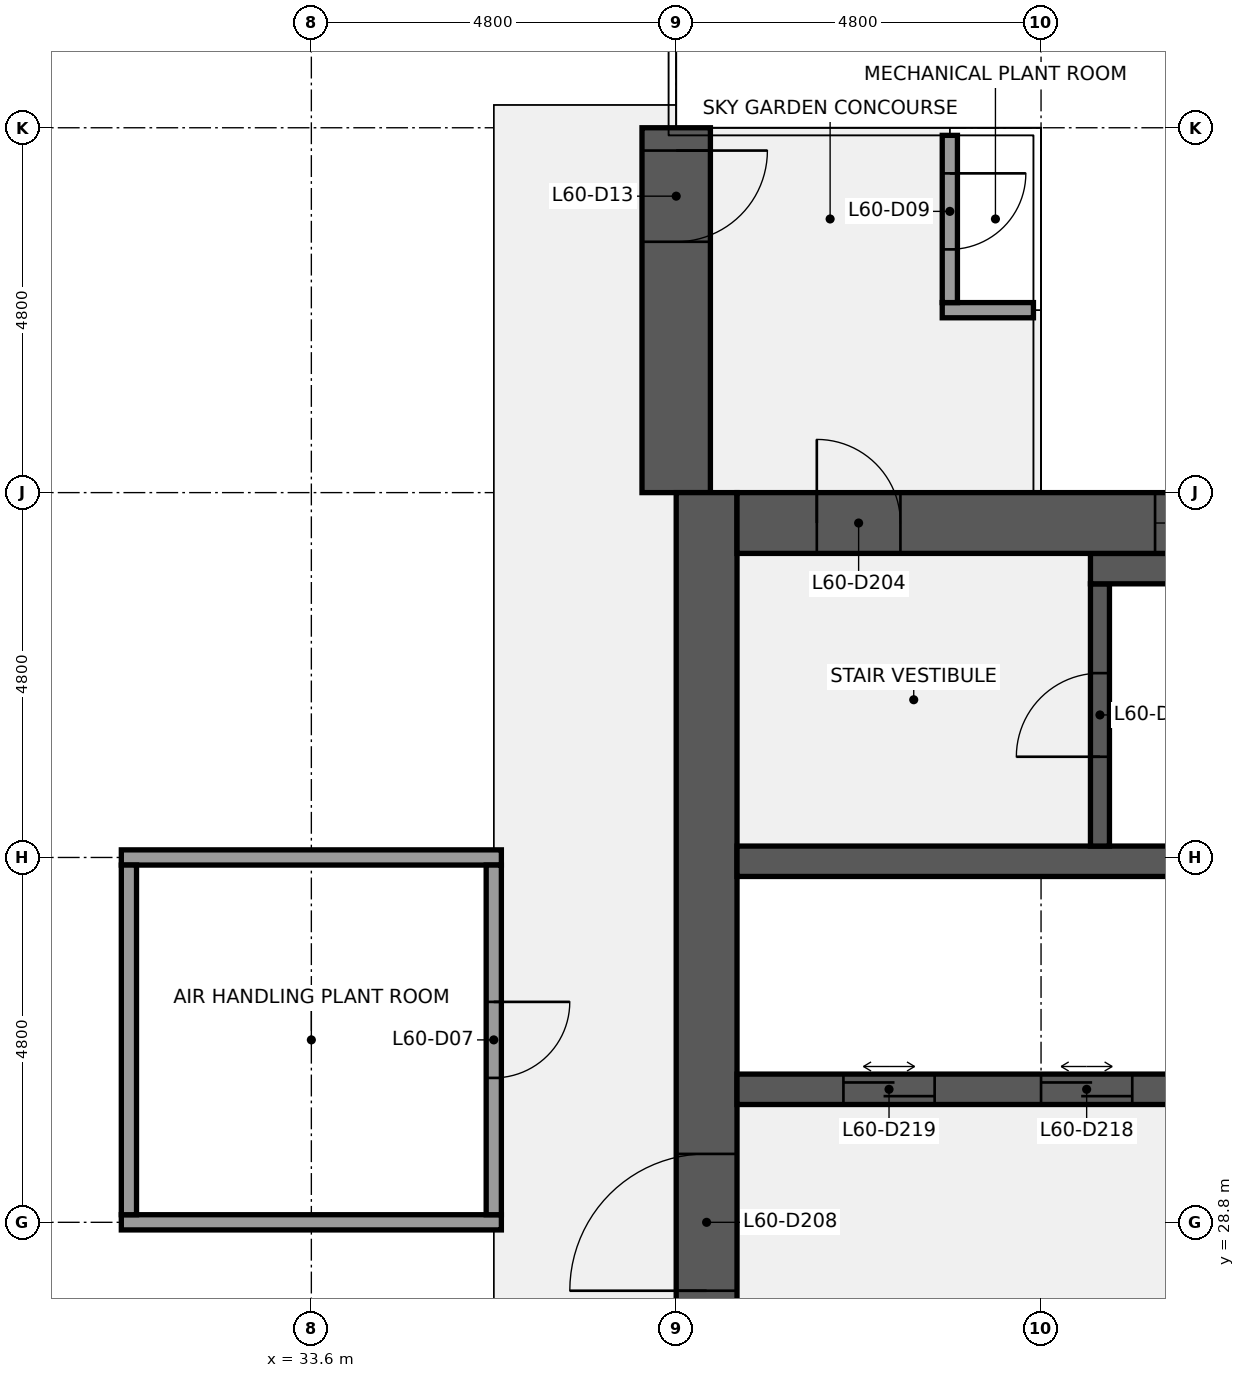
"""IFC4 building model, lengths in metres.
Left out: names, types, materials, properties, quantities, classifications, styles, units other than length and angle.
Written with IfcOpenShell. Run it as: python <this file> out.ifc"""

import sys

from ifc_helpers import new_model, si_unit, direction, frame, frame_2d, origin, place, context, subcontext, project, spatial, rectangle, extrude, element, fill, save


model = new_model("IFC4")
c1 = context("Model", 3, precision=1e-05, world=origin(), true_north=direction((0.0, 1.0)))
c2 = subcontext(c1, "Body", "Model", "MODEL_VIEW")
j1 = project(units=[si_unit("LENGTHUNIT", "METRE"), si_unit("PLANEANGLEUNIT", "RADIAN")], contexts=[c1])
p1 = place(None, origin())
s1 = spatial("IfcSite", under=j1, at=p1, CompositionType="ELEMENT")
p2 = place(p1, origin())
s2 = spatial("IfcBuilding", under=s1, at=p2, CompositionType="ELEMENT")
p3 = place(p2, frame((0.0, 0.0, 269.7)))
s3 = spatial("IfcBuildingStorey", under=s2, at=p3, CompositionType="ELEMENT", Elevation=269.7)
p4 = place(p3, frame((38.4, 38.4, 0.0), z_axis=(0.0, 0.0, 1.0), x_axis=(0.0, 1.0, 0.0)))
e1 = element("IfcWall", 1, at=p4, inside=s3, PredefinedType="SHEAR", context=c2, shape_type="SweptSolid", body=[
    extrude(rectangle(XDim=4.8, YDim=0.9, at=frame_2d((2.4, 0.0))), origin(), (0.0, 0.0, 1.0), 12.3),
])
p5 = place(p4, frame((3.3, 0.0, 0.0)))
e2 = element("IfcOpeningElement", 2, at=p5, cuts=e1, PredefinedType="OPENING", context=c2, shape_type="SweptSolid", body=[
    extrude(rectangle(XDim=1.2, YDim=2.1, at=frame_2d((0.6, 1.05))), frame((0.0, 0.46, 0.0), z_axis=(0.0, -1.0, 0.0), x_axis=(1.0, 0.0, 0.0)), (0.0, 0.0, 1.0), 0.92),
])
p6 = place(p3, frame((38.8, 9.6, 0.0), z_axis=(0.0, 0.0, 1.0), x_axis=(0.0, 1.0, 0.0)))
e3 = element("IfcWall", 3, at=p6, inside=s3, PredefinedType="SHEAR", context=c2, shape_type="SweptSolid", body=[
    extrude(rectangle(XDim=28.8, YDim=0.8, at=frame_2d((14.4, 0.0))), origin(), (0.0, 0.0, 1.0), 12.3),
])
p7 = place(p6, frame((8.7, 0.0, 0.0)))
e4 = element("IfcOpeningElement", 4, at=p7, cuts=e3, PredefinedType="OPENING", context=c2, shape_type="SweptSolid", body=[
    extrude(rectangle(XDim=1.8, YDim=2.1, at=frame_2d((0.9, 1.05))), frame((0.0, 0.41, 0.0), z_axis=(0.0, -1.0, 0.0), x_axis=(1.0, 0.0, 0.0)), (0.0, 0.0, 1.0), 0.82),
])
p8 = place(p6, frame((18.3, 0.0, 0.0)))
e5 = element("IfcOpeningElement", 5, at=p8, cuts=e3, PredefinedType="OPENING", context=c2, shape_type="SweptSolid", body=[
    extrude(rectangle(XDim=1.8, YDim=2.1, at=frame_2d((0.9, 1.05))), frame((0.0, 0.41, 0.0), z_axis=(0.0, -1.0, 0.0), x_axis=(1.0, 0.0, 0.0)), (0.0, 0.0, 1.0), 0.82),
])
p9 = place(p3, frame((39.2, 30.55, 0.0), z_axis=(0.0, 0.0, 1.0), x_axis=(1.0, 0.0, 0.0)))
e6 = element("IfcWall", 6, at=p9, inside=s3, PredefinedType="SHEAR", context=c2, shape_type="SweptSolid", body=[
    extrude(rectangle(XDim=17.6, YDim=0.4, at=frame_2d((8.8, 0.0))), origin(), (0.0, 0.0, 1.0), 12.3),
])
p10 = place(p9, frame((15.0, 0.0, 0.0)))
e7 = element("IfcOpeningElement", 7, at=p10, cuts=e6, PredefinedType="OPENING", context=c2, shape_type="SweptSolid", body=[
    extrude(rectangle(XDim=1.2, YDim=2.1, at=frame_2d((0.6, 1.05))), frame((0.0, 0.21, 0.0), z_axis=(0.0, -1.0, 0.0), x_axis=(1.0, 0.0, 0.0)), (0.0, 0.0, 1.0), 0.42),
])
p11 = place(p9, frame((12.4, 0.0, 0.0)))
e8 = element("IfcOpeningElement", 8, at=p11, cuts=e6, PredefinedType="OPENING", context=c2, shape_type="SweptSolid", body=[
    extrude(rectangle(XDim=1.2, YDim=2.1, at=frame_2d((0.6, 1.05))), frame((0.0, 0.21, 0.0), z_axis=(0.0, -1.0, 0.0), x_axis=(1.0, 0.0, 0.0)), (0.0, 0.0, 1.0), 0.42),
])
p12 = place(p9, frame((9.8, 0.0, 0.0)))
e9 = element("IfcOpeningElement", 9, at=p12, cuts=e6, PredefinedType="OPENING", context=c2, shape_type="SweptSolid", body=[
    extrude(rectangle(XDim=1.2, YDim=2.1, at=frame_2d((0.6, 1.05))), frame((0.0, 0.21, 0.0), z_axis=(0.0, -1.0, 0.0), x_axis=(1.0, 0.0, 0.0)), (0.0, 0.0, 1.0), 0.42),
])
p13 = place(p9, frame((6.6, 0.0, 0.0)))
e10 = element("IfcOpeningElement", 10, at=p13, cuts=e6, PredefinedType="OPENING", context=c2, shape_type="SweptSolid", body=[
    extrude(rectangle(XDim=1.2, YDim=2.1, at=frame_2d((0.6, 1.05))), frame((0.0, 0.21, 0.0), z_axis=(0.0, -1.0, 0.0), x_axis=(1.0, 0.0, 0.0)), (0.0, 0.0, 1.0), 0.42),
])
p14 = place(p9, frame((4.0, 0.0, 0.0)))
e11 = element("IfcOpeningElement", 11, at=p14, cuts=e6, PredefinedType="OPENING", context=c2, shape_type="SweptSolid", body=[
    extrude(rectangle(XDim=1.2, YDim=2.1, at=frame_2d((0.6, 1.05))), frame((0.0, 0.21, 0.0), z_axis=(0.0, -1.0, 0.0), x_axis=(1.0, 0.0, 0.0)), (0.0, 0.0, 1.0), 0.42),
])
p15 = place(p9, frame((1.4, 0.0, 0.0)))
e12 = element("IfcOpeningElement", 12, at=p15, cuts=e6, PredefinedType="OPENING", context=c2, shape_type="SweptSolid", body=[
    extrude(rectangle(XDim=1.2, YDim=2.1, at=frame_2d((0.6, 1.05))), frame((0.0, 0.21, 0.0), z_axis=(0.0, -1.0, 0.0), x_axis=(1.0, 0.0, 0.0)), (0.0, 0.0, 1.0), 0.42),
])
p16 = place(p3, frame((39.2, 33.55, 0.0), z_axis=(0.0, 0.0, 1.0), x_axis=(1.0, 0.0, 0.0)))
e13 = element("IfcWall", 13, at=p16, inside=s3, PredefinedType="SHEAR", context=c2, shape_type="SweptSolid", body=[
    extrude(rectangle(XDim=17.6, YDim=0.4, at=frame_2d((8.8, 0.0))), origin(), (0.0, 0.0, 1.0), 12.3),
])
p17 = place(p3, frame((43.975, 33.75, 0.0), z_axis=(0.0, 0.0, 1.0), x_axis=(0.0, 1.0, 0.0)))
e14 = element("IfcWall", 14, at=p17, inside=s3, PredefinedType="SHEAR", context=c2, shape_type="SweptSolid", body=[
    extrude(rectangle(XDim=3.45, YDim=0.25, at=frame_2d((1.725, 0.0))), origin(), (0.0, 0.0, 1.0), 12.3),
])
p18 = place(p17, frame((1.175, 0.0, 0.0)))
e15 = element("IfcOpeningElement", 15, at=p18, cuts=e14, PredefinedType="OPENING", context=c2, shape_type="SweptSolid", body=[
    extrude(rectangle(XDim=1.1, YDim=2.1, at=frame_2d((0.55, 1.05))), frame((0.0, 0.135, 0.0), z_axis=(0.0, -1.0, 0.0), x_axis=(1.0, 0.0, 0.0)), (0.0, 0.0, 1.0), 0.27),
])
p19 = place(p3, frame((43.85, 37.4, 0.0), z_axis=(0.0, 0.0, 1.0), x_axis=(1.0, 0.0, 0.0)))
e16 = element("IfcWall", 16, at=p19, inside=s3, PredefinedType="SHEAR", context=c2, shape_type="SweptSolid", body=[
    extrude(rectangle(XDim=7.5, YDim=0.4, at=frame_2d((3.75, 0.0))), origin(), (0.0, 0.0, 1.0), 12.3),
])
p20 = place(p3, frame((39.2, 38.0, 0.0), z_axis=(0.0, 0.0, 1.0), x_axis=(1.0, 0.0, 0.0)))
e17 = element("IfcWall", 17, at=p20, inside=s3, PredefinedType="SHEAR", context=c2, shape_type="SweptSolid", body=[
    extrude(rectangle(XDim=17.6, YDim=0.8, at=frame_2d((8.8, 0.0))), origin(), (0.0, 0.0, 1.0), 12.3),
])
p21 = place(p20, frame((1.05, 0.0, 0.0)))
e18 = element("IfcOpeningElement", 18, at=p21, cuts=e17, PredefinedType="OPENING", context=c2, shape_type="SweptSolid", body=[
    extrude(rectangle(XDim=1.1, YDim=2.1, at=frame_2d((0.55, 1.05))), frame((0.0, 0.41, 0.0), z_axis=(0.0, -1.0, 0.0), x_axis=(1.0, 0.0, 0.0)), (0.0, 0.0, 1.0), 0.82),
])
p22 = place(p20, frame((10.3, 0.0, 0.9)))
e19 = element("IfcOpeningElement", 19, at=p22, cuts=e17, PredefinedType="OPENING", context=c2, shape_type="SweptSolid", body=[
    extrude(rectangle(XDim=1.8, YDim=1.5, at=frame_2d((0.9, 0.75))), frame((0.0, 0.41, 0.0), z_axis=(0.0, -1.0, 0.0), x_axis=(1.0, 0.0, 0.0)), (0.0, 0.0, 1.0), 0.82),
])
p23 = place(p20, frame((5.5, 0.0, 0.9)))
e20 = element("IfcOpeningElement", 20, at=p23, cuts=e17, PredefinedType="OPENING", context=c2, shape_type="SweptSolid", body=[
    extrude(rectangle(XDim=1.8, YDim=1.5, at=frame_2d((0.9, 0.75))), frame((0.0, 0.41, 0.0), z_axis=(0.0, -1.0, 0.0), x_axis=(1.0, 0.0, 0.0)), (0.0, 0.0, 1.0), 0.82),
])
for number, where, z_axis, x_axis in (
    (21, (31.1, 28.8, 0.0), (0.0, 0.0, 1.0), (1.0, 0.0, 0.0)),
    (22, (31.1, 33.6, 0.0), (0.0, 0.0, 1.0), (1.0, 0.0, 0.0)),
):
    element("IfcWall", number, at=place(p3, frame(where, z_axis=z_axis, x_axis=x_axis)), inside=s3, PredefinedType="PARTITIONING", context=c2, shape_type="SweptSolid", body=[
        extrude(rectangle(XDim=5.0, YDim=0.2, at=frame_2d((2.5, 0.0))), origin(), (0.0, 0.0, 1.0), 11.31),
    ])
p24 = place(p3, frame((41.9, 40.8, 0.0), z_axis=(0.0, 0.0, 1.0), x_axis=(1.0, 0.0, 0.0)))
e23 = element("IfcWall", 23, at=p24, inside=s3, PredefinedType="PARTITIONING", context=c2, shape_type="SweptSolid", body=[
    extrude(rectangle(XDim=1.2, YDim=0.2, at=frame_2d((0.6, 0.0))), origin(), (0.0, 0.0, 1.0), 11.31),
])
p25 = place(p3, frame((31.2, 28.9, 0.0), z_axis=(0.0, 0.0, 1.0), x_axis=(0.0, 1.0, 0.0)))
e24 = element("IfcWall", 24, at=p25, inside=s3, PredefinedType="PARTITIONING", context=c2, shape_type="SweptSolid", body=[
    extrude(rectangle(XDim=4.6, YDim=0.2, at=frame_2d((2.3, 0.0))), origin(), (0.0, 0.0, 1.0), 11.31),
])
p26 = place(p3, frame((36.0, 28.9, 0.0), z_axis=(0.0, 0.0, 1.0), x_axis=(0.0, 1.0, 0.0)))
e25 = element("IfcWall", 25, at=p26, inside=s3, PredefinedType="PARTITIONING", context=c2, shape_type="SweptSolid", body=[
    extrude(rectangle(XDim=4.6, YDim=0.2, at=frame_2d((2.3, 0.0))), origin(), (0.0, 0.0, 1.0), 11.31),
])
p27 = place(p26, frame((1.8, 0.0, 0.0)))
e26 = element("IfcOpeningElement", 26, at=p27, cuts=e25, PredefinedType="OPENING", context=c2, shape_type="SweptSolid", body=[
    extrude(rectangle(XDim=1.0, YDim=2.1, at=frame_2d((0.5, 1.05))), frame((0.0, 0.11, 0.0), z_axis=(0.0, -1.0, 0.0), x_axis=(1.0, 0.0, 0.0)), (0.0, 0.0, 1.0), 0.22),
])
p28 = place(p3, frame((42.0, 40.9, 0.0), z_axis=(0.0, 0.0, 1.0), x_axis=(0.0, 1.0, 0.0)))
e27 = element("IfcWall", 27, at=p28, inside=s3, PredefinedType="PARTITIONING", context=c2, shape_type="SweptSolid", body=[
    extrude(rectangle(XDim=2.2, YDim=0.2, at=frame_2d((1.1, 0.0))), origin(), (0.0, 0.0, 1.0), 11.31),
])
p29 = place(p28, frame((0.7, 0.0, 0.0)))
e28 = element("IfcOpeningElement", 28, at=p29, cuts=e27, PredefinedType="OPENING", context=c2, shape_type="SweptSolid", body=[
    extrude(rectangle(XDim=1.0, YDim=2.1, at=frame_2d((0.5, 1.05))), frame((0.0, 0.11, 0.0), z_axis=(0.0, -1.0, 0.0), x_axis=(1.0, 0.0, 0.0)), (0.0, 0.0, 1.0), 0.22),
])
p30 = place(p18, origin())
e29 = element("IfcDoor", 29, at=p30, inside=s3, OperationType="SINGLE_SWING_LEFT", PredefinedType="DOOR", context=c2, shape_type="SweptSolid", body=[
    extrude(rectangle(XDim=1.1, YDim=2.1, at=frame_2d((0.55, 1.05))), frame((0.0, 0.025, 0.0), z_axis=(0.0, -1.0, 0.0), x_axis=(1.0, 0.0, 0.0)), (0.0, 0.0, 1.0), 0.05),
])
fill(e15, e29)
p31 = place(p21, origin())
e30 = element("IfcDoor", 30, at=p31, inside=s3, OperationType="SINGLE_SWING_LEFT", PredefinedType="DOOR", context=c2, shape_type="SweptSolid", body=[
    extrude(rectangle(XDim=1.1, YDim=2.1, at=frame_2d((0.55, 1.05))), frame((0.0, 0.025, 0.0), z_axis=(0.0, -1.0, 0.0), x_axis=(1.0, 0.0, 0.0)), (0.0, 0.0, 1.0), 0.05),
])
fill(e18, e30)
p32 = place(p8, origin())
e31 = element("IfcDoor", 31, at=p32, inside=s3, OperationType="DOUBLE_DOOR_SINGLE_SWING", PredefinedType="DOOR", context=c2, shape_type="SweptSolid", body=[
    extrude(rectangle(XDim=1.8, YDim=2.1, at=frame_2d((0.9, 1.05))), frame((0.0, 0.025, 0.0), z_axis=(0.0, -1.0, 0.0), x_axis=(1.0, 0.0, 0.0)), (0.0, 0.0, 1.0), 0.05),
])
fill(e5, e31)
p33 = place(p14, origin())
e32 = element("IfcDoor", 32, at=p33, inside=s3, OperationType="DOUBLE_DOOR_SLIDING", PredefinedType="DOOR", context=c2, shape_type="SweptSolid", body=[
    extrude(rectangle(XDim=1.2, YDim=2.1, at=frame_2d((0.6, 1.05))), frame((0.0, 0.025, 0.0), z_axis=(0.0, -1.0, 0.0), x_axis=(1.0, 0.0, 0.0)), (0.0, 0.0, 1.0), 0.05),
])
fill(e11, e32)
p34 = place(p15, origin())
e33 = element("IfcDoor", 33, at=p34, inside=s3, OperationType="DOUBLE_DOOR_SLIDING", PredefinedType="DOOR", context=c2, shape_type="SweptSolid", body=[
    extrude(rectangle(XDim=1.2, YDim=2.1, at=frame_2d((0.6, 1.05))), frame((0.0, 0.025, 0.0), z_axis=(0.0, -1.0, 0.0), x_axis=(1.0, 0.0, 0.0)), (0.0, 0.0, 1.0), 0.05),
])
fill(e12, e33)
p35 = place(p23, origin())
e34 = element("IfcWindow", 34, at=p35, inside=s3, PartitioningType="SINGLE_PANEL", PredefinedType="WINDOW", context=c2, shape_type="SweptSolid", body=[
    extrude(rectangle(XDim=1.8, YDim=1.5, at=frame_2d((0.9, 0.75))), frame((0.0, 0.03, 0.0), z_axis=(0.0, -1.0, 0.0), x_axis=(1.0, 0.0, 0.0)), (0.0, 0.0, 1.0), 0.06),
])
fill(e20, e34)
p36 = place(p27, origin())
e35 = element("IfcDoor", 35, at=p36, inside=s3, OperationType="SINGLE_SWING_RIGHT", PredefinedType="DOOR", context=c2, shape_type="SweptSolid", body=[
    extrude(rectangle(XDim=1.0, YDim=2.1, at=frame_2d((0.5, 1.05))), frame((0.0, 0.025, 0.0), z_axis=(0.0, -1.0, 0.0), x_axis=(1.0, 0.0, 0.0)), (0.0, 0.0, 1.0), 0.05),
])
fill(e26, e35)
p37 = place(p29, origin())
e36 = element("IfcDoor", 36, at=p37, inside=s3, OperationType="SINGLE_SWING_RIGHT", PredefinedType="DOOR", context=c2, shape_type="SweptSolid", body=[
    extrude(rectangle(XDim=1.0, YDim=2.1, at=frame_2d((0.5, 1.05))), frame((0.0, 0.025, 0.0), z_axis=(0.0, -1.0, 0.0), x_axis=(1.0, 0.0, 0.0)), (0.0, 0.0, 1.0), 0.05),
])
fill(e28, e36)
p38 = place(p5, origin())
e37 = element("IfcDoor", 37, at=p38, inside=s3, OperationType="SINGLE_SWING_RIGHT", PredefinedType="DOOR", context=c2, shape_type="SweptSolid", body=[
    extrude(rectangle(XDim=1.2, YDim=2.1, at=frame_2d((0.6, 1.05))), frame((0.0, 0.025, 0.0), z_axis=(0.0, -1.0, 0.0), x_axis=(1.0, 0.0, 0.0)), (0.0, 0.0, 1.0), 0.05),
])
fill(e2, e37)
save(model, sys.argv[1])
